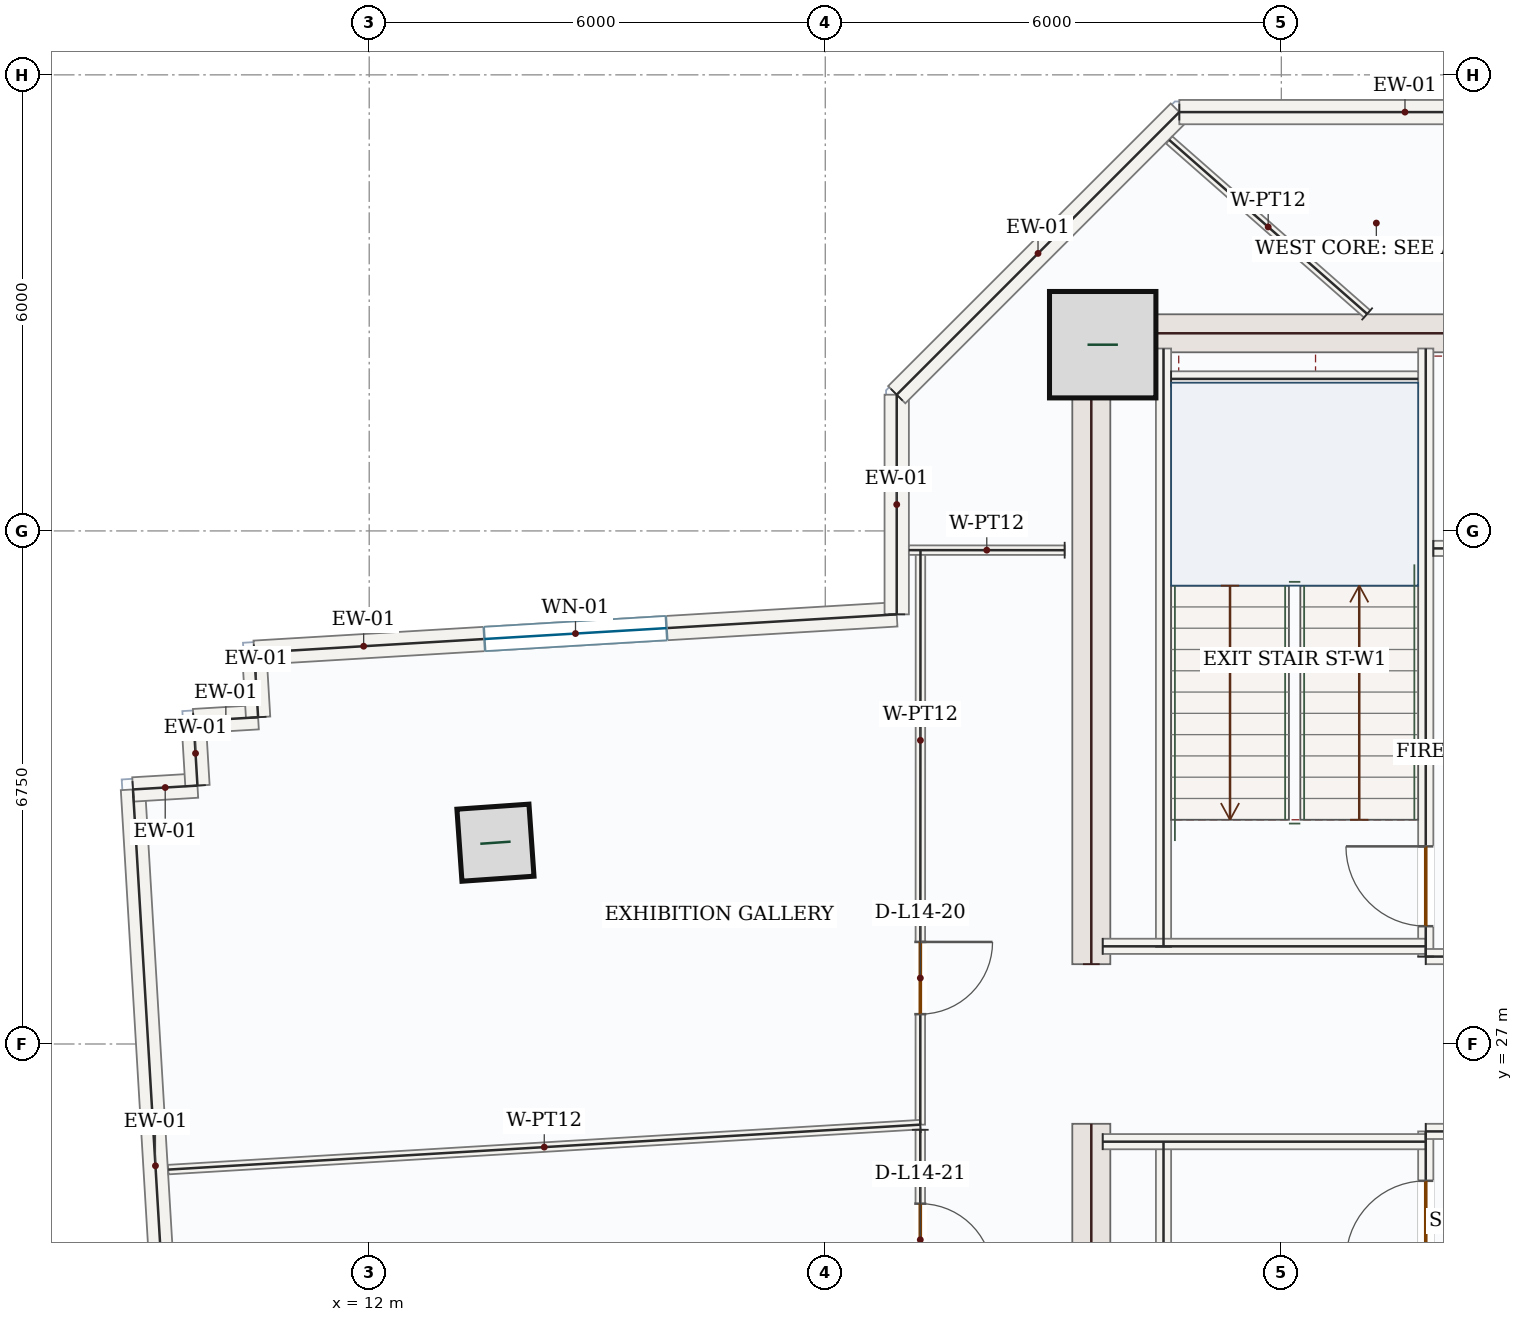
"""IFC4 building model, lengths in metres.
Left out: names, types, materials, properties, quantities, classifications, styles, units other than length and angle.
Written with IfcOpenShell. Run it as: python <this file> out.ifc"""

import sys

from ifc_helpers import new_model, si_unit, direction, frame, frame_2d, origin, origin_2d, place, context, subcontext, project, spatial, rectangle, hollow_rectangle, extrude, source, transform, mapped, element, fill, save


model = new_model("IFC4")
c1 = context("Model", 3, precision=1e-05, world=origin(), true_north=direction((0.0, 1.0)))
c2 = subcontext(c1, "Body", "Model", "MODEL_VIEW")
j1 = project(units=[si_unit("LENGTHUNIT", "METRE"), si_unit("PLANEANGLEUNIT", "RADIAN")], contexts=[c1])
p1 = place(None, origin())
s1 = spatial("IfcSite", under=j1, at=p1, CompositionType="ELEMENT")
p2 = place(p1, origin())
s2 = spatial("IfcBuilding", under=s1, at=p2, CompositionType="ELEMENT")
p3 = place(p2, frame((0.0, 0.0, 66.9)))
s3 = spatial("IfcBuildingStorey", under=s2, at=p3, CompositionType="ELEMENT", Elevation=66.9)
m1 = source(origin(), c2, "Body", "SweptSolid", [
    extrude(rectangle(XDim=8.55, YDim=0.5, at=frame_2d((4.275, 0.0))), origin(), (0.0, 0.0, 1.0), 3.95),
])
for number, where, z_axis, x_axis in (
    (1, (21.5, 17.4, 0.0), (0.0, 0.0, 1.0), (0.0, 1.0, 0.0)),
    (2, (21.5, 28.05, 0.0), (0.0, 0.0, 1.0), (0.0, 1.0, 0.0)),
):
    element("IfcWall", number, at=place(p3, frame(where, z_axis=z_axis, x_axis=x_axis)), inside=s3, PredefinedType="SHEAR", context=c2, shape_type="MappedRepresentation", body=[
        mapped(m1, transform((0.0, 0.0, 0.0), x_axis=(1.0, 0.0, 0.0), y_axis=(0.0, 1.0, 0.0), z_axis=(0.0, 0.0, 1.0), scale=1.0)),
    ])
m2 = source(origin(), c2, "Body", "SweptSolid", [
    extrude(rectangle(XDim=7.0, YDim=0.5, at=frame_2d((3.5, 0.0))), origin(), (0.0, 0.0, 1.0), 3.95),
])
p4 = place(p3, frame((21.75, 36.35, 0.0), z_axis=(0.0, 0.0, 1.0), x_axis=(1.0, 0.0, 0.0)))
e3 = element("IfcWall", 3, at=p4, inside=s3, PredefinedType="SHEAR", context=c2, shape_type="MappedRepresentation", body=[
    mapped(m2, transform((0.0, 0.0, 0.0), x_axis=(1.0, 0.0, 0.0), y_axis=(0.0, 1.0, 0.0), z_axis=(0.0, 0.0, 1.0), scale=1.0)),
])
m3 = source(origin(), c2, "Body", "SweptSolid", [
    extrude(rectangle(XDim=1.4, YDim=1.4, at=origin_2d()), origin(), (0.0, 0.0, 1.0), 4.2),
])
p5 = place(p3, frame((21.65, 36.2, 0.0), z_axis=(0.0, 0.0, 1.0), x_axis=(1.0, 0.0, 0.0)))
e4 = element("IfcColumn", 4, at=p5, inside=s3, PredefinedType="COLUMN", context=c2, shape_type="MappedRepresentation", body=[
    mapped(m3, transform((0.0, 0.0, 0.0), x_axis=(1.0, 0.0, 0.0), y_axis=(0.0, 1.0, 0.0), z_axis=(0.0, 0.0, 1.0), scale=1.0)),
])
m4 = source(origin(), c2, "Body", "SweptSolid", [
    extrude(hollow_rectangle(XDim=0.95, YDim=0.95, WallThickness=0.05, at=origin_2d()), origin(), (0.0, 0.0, 1.0), 4.2),
])
p6 = place(p3, frame((13.661, 29.648, 0.0), z_axis=(0.0, 0.0, 1.0), x_axis=(0.99756405026, 0.069756473744, 0.0)))
e5 = element("IfcColumn", 5, at=p6, inside=s3, PredefinedType="COLUMN", context=c2, shape_type="MappedRepresentation", body=[
    mapped(m4, transform((0.0, 0.0, 0.0), x_axis=(1.0, 0.0, 0.0), y_axis=(0.0, 1.0, 0.0), z_axis=(0.0, 0.0, 1.0), scale=1.0)),
])
m5 = source(origin(), c2, "Body", "SweptSolid", [
    extrude(rectangle(XDim=9.92, YDim=0.32, at=frame_2d((4.96, 0.0))), origin(), (0.0, 0.0, 1.0), 3.95),
])
p7 = place(p3, frame((9.484, 20.447, 0.0), z_axis=(0.0, 0.0, 1.0), x_axis=(-0.059656871726, 0.998218942745, 0.0)))
e6 = element("IfcWall", 6, at=p7, inside=s3, PredefinedType="SOLIDWALL", context=c2, shape_type="MappedRepresentation", body=[
    mapped(m5, transform((0.0, 0.0, 0.0), x_axis=(1.0, 0.0, 0.0), y_axis=(0.0, 1.0, 0.0), z_axis=(0.0, 0.0, 1.0), scale=1.0)),
])
m6 = source(origin(), c2, "Body", "SweptSolid", [
    extrude(rectangle(XDim=0.85, YDim=0.32, at=frame_2d((0.425, 0.0))), origin(), (0.0, 0.0, 1.0), 3.95),
])
for number, where, z_axis, x_axis in (
    (7, (8.892, 30.349, 0.0), (0.0, 0.0, 1.0), (0.998, 0.059, 0.0)),
    (8, (9.74, 30.399, 0.0), (0.0, 0.0, 1.0), (-0.06, 0.998, 0.0)),
):
    element("IfcWall", number, at=place(p3, frame(where, z_axis=z_axis, x_axis=x_axis)), inside=s3, PredefinedType="SOLIDWALL", context=c2, shape_type="MappedRepresentation", body=[
        mapped(m6, transform((0.0, 0.0, 0.0), x_axis=(1.0, 0.0, 0.0), y_axis=(0.0, 1.0, 0.0), z_axis=(0.0, 0.0, 1.0), scale=1.0)),
    ])
m7 = source(origin(), c2, "Body", "SweptSolid", [
    extrude(rectangle(XDim=0.85, YDim=0.32, at=frame_2d((0.425, 0.0))), origin(), (0.0, 0.0, 1.0), 3.95),
])
p8 = place(p3, frame((9.69, 31.248, 0.0), z_axis=(0.0, 0.0, 1.0), x_axis=(0.998230513845, 0.059462939961, 0.0)))
e9 = element("IfcWall", 9, at=p8, inside=s3, PredefinedType="SOLIDWALL", context=c2, shape_type="MappedRepresentation", body=[
    mapped(m7, transform((0.0, 0.0, 0.0), x_axis=(1.0, 0.0, 0.0), y_axis=(0.0, 1.0, 0.0), z_axis=(0.0, 0.0, 1.0), scale=1.0)),
])
p9 = place(p3, frame((10.538, 31.299, 0.0), z_axis=(0.0, 0.0, 1.0), x_axis=(-0.059445893707, 0.998231529116, 0.0)))
e10 = element("IfcWall", 10, at=p9, inside=s3, PredefinedType="SOLIDWALL", context=c2, shape_type="MappedRepresentation", body=[
    mapped(m6, transform((0.0, 0.0, 0.0), x_axis=(1.0, 0.0, 0.0), y_axis=(0.0, 1.0, 0.0), z_axis=(0.0, 0.0, 1.0), scale=1.0)),
])
p10 = place(p3, frame((10.488, 32.147, 0.0), z_axis=(0.0, 0.0, 1.0), x_axis=(0.998219055518, 0.059654984716, 0.0)))
e11 = element("IfcWall", 11, at=p10, inside=s3, PredefinedType="SOLIDWALL", context=c2, shape_type="SweptSolid", body=[
    extrude(rectangle(XDim=8.468, YDim=0.32, at=frame_2d((4.234, 0.0))), origin(), (0.0, 0.0, 1.0), 3.95),
])
p11 = place(p10, frame((3.034, 0.0, 0.85)))
e12 = element("IfcOpeningElement", 12, at=p11, cuts=e11, PredefinedType="OPENING", context=c2, shape_type="SweptSolid", body=[
    extrude(rectangle(XDim=2.4, YDim=1.8, at=frame_2d((1.2, 0.9))), frame((0.0, 0.17, 0.0), z_axis=(0.0, -1.0, 0.0), x_axis=(1.0, 0.0, 0.0)), (0.0, 0.0, 1.0), 0.34),
])
m8 = source(origin(), c2, "Body", "SweptSolid", [
    extrude(rectangle(XDim=2.89, YDim=0.32, at=frame_2d((1.445, 0.0))), origin(), (0.0, 0.0, 1.0), 3.95),
])
p12 = place(p3, frame((18.94, 32.652, 0.0), z_axis=(0.0, 0.0, 1.0), x_axis=(0.0, 1.0, 0.0)))
e13 = element("IfcWall", 13, at=p12, inside=s3, PredefinedType="SOLIDWALL", context=c2, shape_type="MappedRepresentation", body=[
    mapped(m8, transform((0.0, 0.0, 0.0), x_axis=(1.0, 0.0, 0.0), y_axis=(0.0, 1.0, 0.0), z_axis=(0.0, 0.0, 1.0), scale=1.0)),
])
m9 = source(origin(), c2, "Body", "SweptSolid", [
    extrude(rectangle(XDim=5.258, YDim=0.32, at=frame_2d((2.629, 0.0))), origin(), (0.0, 0.0, 1.0), 3.95),
])
p13 = place(p3, frame((18.94, 35.542, 0.0), z_axis=(0.0, 0.0, 1.0), x_axis=(0.707106781187, 0.707106781187, 0.0)))
e14 = element("IfcWall", 14, at=p13, inside=s3, PredefinedType="SOLIDWALL", context=c2, shape_type="MappedRepresentation", body=[
    mapped(m9, transform((0.0, 0.0, 0.0), x_axis=(1.0, 0.0, 0.0), y_axis=(0.0, 1.0, 0.0), z_axis=(0.0, 0.0, 1.0), scale=1.0)),
])
m10 = source(origin(), c2, "Body", "SweptSolid", [
    extrude(rectangle(XDim=5.938, YDim=0.32, at=frame_2d((2.969, 0.0))), origin(), (0.0, 0.0, 1.0), 3.95),
])
p14 = place(p3, frame((22.658, 39.26, 0.0), z_axis=(0.0, 0.0, 1.0), x_axis=(1.0, 0.0, 0.0)))
e15 = element("IfcWall", 15, at=p14, inside=s3, PredefinedType="SOLIDWALL", context=c2, shape_type="MappedRepresentation", body=[
    mapped(m10, transform((0.0, 0.0, 0.0), x_axis=(1.0, 0.0, 0.0), y_axis=(0.0, 1.0, 0.0), z_axis=(0.0, 0.0, 1.0), scale=1.0)),
])
m11 = source(origin(), c2, "Body", "SweptSolid", [
    extrude(rectangle(XDim=7.87, YDim=0.2, at=frame_2d((3.935, 0.0))), origin(), (0.0, 0.0, 1.0), 3.95),
])
for number, where, z_axis, x_axis in (
    (16, (22.45, 17.85, 0.0), (0.0, 0.0, 1.0), (0.0, 1.0, 0.0)),
    (17, (22.45, 28.28, 0.0), (0.0, 0.0, 1.0), (0.0, 1.0, 0.0)),
):
    element("IfcWall", number, at=place(p3, frame(where, z_axis=z_axis, x_axis=x_axis)), inside=s3, PredefinedType="SOLIDWALL", context=c2, shape_type="MappedRepresentation", body=[
        mapped(m11, transform((0.0, 0.0, 0.0), x_axis=(1.0, 0.0, 0.0), y_axis=(0.0, 1.0, 0.0), z_axis=(0.0, 0.0, 1.0), scale=1.0)),
    ])
p15 = place(p3, frame((25.9, 17.85, 0.0), z_axis=(0.0, 0.0, 1.0), x_axis=(0.0, 1.0, 0.0)))
e18 = element("IfcWall", 18, at=p15, inside=s3, PredefinedType="SOLIDWALL", context=c2, shape_type="SweptSolid", body=[
    extrude(rectangle(XDim=8.0, YDim=0.2, at=frame_2d((4.0, 0.0))), origin(), (0.0, 0.0, 1.0), 3.95),
])
p16 = place(p15, frame((6.3, 0.0, 0.0)))
e19 = element("IfcOpeningElement", 19, at=p16, cuts=e18, PredefinedType="OPENING", context=c2, shape_type="SweptSolid", body=[
    extrude(rectangle(XDim=1.05, YDim=2.15, at=frame_2d((0.525, 1.075))), frame((0.0, 0.11, 0.0), z_axis=(0.0, -1.0, 0.0), x_axis=(1.0, 0.0, 0.0)), (0.0, 0.0, 1.0), 0.22),
])
p17 = place(p3, frame((25.9, 28.15, 0.0), z_axis=(0.0, 0.0, 1.0), x_axis=(0.0, 1.0, 0.0)))
e20 = element("IfcWall", 20, at=p17, inside=s3, PredefinedType="SOLIDWALL", context=c2, shape_type="SweptSolid", body=[
    extrude(rectangle(XDim=8.0, YDim=0.2, at=frame_2d((4.0, 0.0))), origin(), (0.0, 0.0, 1.0), 3.95),
])
p18 = place(p17, frame((0.4, 0.0, 0.0)))
e21 = element("IfcOpeningElement", 21, at=p18, cuts=e20, PredefinedType="OPENING", context=c2, shape_type="SweptSolid", body=[
    extrude(rectangle(XDim=1.05, YDim=2.15, at=frame_2d((0.525, 1.075))), frame((0.0, 0.11, 0.0), z_axis=(0.0, -1.0, 0.0), x_axis=(1.0, 0.0, 0.0)), (0.0, 0.0, 1.0), 0.22),
])
m12 = source(origin(), c2, "Body", "SweptSolid", [
    extrude(rectangle(XDim=4.25, YDim=0.2, at=frame_2d((2.125, 0.0))), origin(), (0.0, 0.0, 1.0), 3.95),
])
p19 = place(p3, frame((21.65, 25.715, 0.0), z_axis=(0.0, 0.0, 1.0), x_axis=(1.0, 0.0, 0.0)))
e22 = element("IfcWall", 22, at=p19, inside=s3, PredefinedType="SOLIDWALL", context=c2, shape_type="MappedRepresentation", body=[
    mapped(m12, transform((0.0, 0.0, 0.0), x_axis=(1.0, 0.0, 0.0), y_axis=(0.0, 1.0, 0.0), z_axis=(0.0, 0.0, 1.0), scale=1.0)),
])
m13 = source(origin(), c2, "Body", "SweptSolid", [
    extrude(rectangle(XDim=3.0, YDim=0.2, at=frame_2d((1.5, 0.0))), origin(), (0.0, 0.0, 1.0), 3.95),
])
p20 = place(p3, frame((25.9, 25.85, 0.0), z_axis=(0.0, 0.0, 1.0), x_axis=(1.0, 0.0, 0.0)))
e23 = element("IfcWall", 23, at=p20, inside=s3, PredefinedType="SOLIDWALL", context=c2, shape_type="MappedRepresentation", body=[
    mapped(m13, transform((0.0, 0.0, 0.0), x_axis=(1.0, 0.0, 0.0), y_axis=(0.0, 1.0, 0.0), z_axis=(0.0, 0.0, 1.0), scale=1.0)),
])
p21 = place(p3, frame((21.65, 28.285, 0.0), z_axis=(0.0, 0.0, 1.0), x_axis=(1.0, 0.0, 0.0)))
e24 = element("IfcWall", 24, at=p21, inside=s3, PredefinedType="SOLIDWALL", context=c2, shape_type="MappedRepresentation", body=[
    mapped(m12, transform((0.0, 0.0, 0.0), x_axis=(1.0, 0.0, 0.0), y_axis=(0.0, 1.0, 0.0), z_axis=(0.0, 0.0, 1.0), scale=1.0)),
])
p22 = place(p3, frame((25.9, 28.15, 0.0), z_axis=(0.0, 0.0, 1.0), x_axis=(1.0, 0.0, 0.0)))
e25 = element("IfcWall", 25, at=p22, inside=s3, PredefinedType="SOLIDWALL", context=c2, shape_type="MappedRepresentation", body=[
    mapped(m13, transform((0.0, 0.0, 0.0), x_axis=(1.0, 0.0, 0.0), y_axis=(0.0, 1.0, 0.0), z_axis=(0.0, 0.0, 1.0), scale=1.0)),
])
m14 = source(origin(), c2, "Body", "SweptSolid", [
    extrude(rectangle(XDim=3.25, YDim=0.2, at=frame_2d((1.625, 0.0))), origin(), (0.0, 0.0, 1.0), 3.95),
])
p23 = place(p3, frame((22.55, 35.75, 0.0), z_axis=(0.0, 0.0, 1.0), x_axis=(1.0, 0.0, 0.0)))
e26 = element("IfcWall", 26, at=p23, inside=s3, PredefinedType="SOLIDWALL", context=c2, shape_type="MappedRepresentation", body=[
    mapped(m14, transform((0.0, 0.0, 0.0), x_axis=(1.0, 0.0, 0.0), y_axis=(0.0, 1.0, 0.0), z_axis=(0.0, 0.0, 1.0), scale=1.0)),
])
p24 = place(p3, frame((26.0, 33.52, 0.0), z_axis=(0.0, 0.0, 1.0), x_axis=(1.0, 0.0, 0.0)))
e27 = element("IfcWall", 27, at=p24, inside=s3, PredefinedType="SOLIDWALL", context=c2, shape_type="SweptSolid", body=[
    extrude(rectangle(XDim=2.75, YDim=0.2, at=frame_2d((1.375, 0.0))), origin(), (0.0, 0.0, 1.0), 3.95),
])
p25 = place(p24, frame((0.82, 0.0, 0.0)))
e28 = element("IfcOpeningElement", 28, at=p25, cuts=e27, PredefinedType="OPENING", context=c2, shape_type="SweptSolid", body=[
    extrude(rectangle(XDim=1.1, YDim=2.15, at=frame_2d((0.55, 1.075))), frame((0.0, 0.11, 0.0), z_axis=(0.0, -1.0, 0.0), x_axis=(1.0, 0.0, 0.0)), (0.0, 0.0, 1.0), 0.22),
])
m15 = source(origin(), c2, "Body", "SweptSolid", [
    extrude(rectangle(XDim=3.467, YDim=0.125, at=frame_2d((1.733, 0.0))), origin(), (0.0, 0.0, 1.0), 3.95),
])
p26 = place(p3, frame((25.129, 36.605, 0.0), z_axis=(0.0, 0.0, 1.0), x_axis=(-0.751135268809, 0.66014832269, 0.0)))
e29 = element("IfcWall", 29, at=p26, inside=s3, PredefinedType="PARTITIONING", context=c2, shape_type="MappedRepresentation", body=[
    mapped(m15, transform((0.0, 0.0, 0.0), x_axis=(1.0, 0.0, 0.0), y_axis=(0.0, 1.0, 0.0), z_axis=(0.0, 0.0, 1.0), scale=1.0)),
])
p27 = place(p3, frame((19.253, 33.497, 0.0), z_axis=(0.0, 0.0, 1.0), x_axis=(-0.000355308612, -0.999999936878, 0.0)))
e30 = element("IfcWall", 30, at=p27, inside=s3, PredefinedType="PARTITIONING", context=c2, shape_type="SweptSolid", body=[
    extrude(rectangle(XDim=7.558, YDim=0.125, at=frame_2d((3.779, 0.0))), origin(), (0.0, 0.0, 1.0), 3.95),
])
p28 = place(p27, frame((5.155, 0.0, 0.0)))
e31 = element("IfcOpeningElement", 31, at=p28, cuts=e30, PredefinedType="OPENING", context=c2, shape_type="SweptSolid", body=[
    extrude(rectangle(XDim=0.95, YDim=2.15, at=frame_2d((0.475, 1.075))), frame((0.0, 0.073, 0.0), z_axis=(0.0, -1.0, 0.0), x_axis=(1.0, 0.0, 0.0)), (0.0, 0.0, 1.0), 0.145),
])
m16 = source(origin(), c2, "Body", "SweptSolid", [
    extrude(rectangle(XDim=9.911, YDim=0.125, at=frame_2d((4.956, 0.0))), origin(), (0.0, 0.0, 1.0), 3.95),
])
p29 = place(p3, frame((19.25, 25.939, 0.0), z_axis=(0.0, 0.0, 1.0), x_axis=(-0.998218808208, -0.05965912285, 0.0)))
e32 = element("IfcWall", 32, at=p29, inside=s3, PredefinedType="PARTITIONING", context=c2, shape_type="MappedRepresentation", body=[
    mapped(m16, transform((0.0, 0.0, 0.0), x_axis=(1.0, 0.0, 0.0), y_axis=(0.0, 1.0, 0.0), z_axis=(0.0, 0.0, 1.0), scale=1.0)),
])
m17 = source(origin(), c2, "Body", "SweptSolid", [
    extrude(rectangle(XDim=2.049, YDim=0.125, at=frame_2d((1.025, 0.0))), origin(), (0.0, 0.0, 1.0), 3.95),
])
p30 = place(p3, frame((21.149, 33.497, 0.0), z_axis=(0.0, 0.0, 1.0), x_axis=(-0.999999936133, 0.000357398119, 0.0)))
e33 = element("IfcWall", 33, at=p30, inside=s3, PredefinedType="PARTITIONING", context=c2, shape_type="MappedRepresentation", body=[
    mapped(m17, transform((0.0, 0.0, 0.0), x_axis=(1.0, 0.0, 0.0), y_axis=(0.0, 1.0, 0.0), z_axis=(0.0, 0.0, 1.0), scale=1.0)),
])
p31 = place(p3, frame((19.25, 25.871, 0.0), z_axis=(0.0, 0.0, 1.0), x_axis=(9.0962841e-05, -0.999999995863, 0.0)))
e34 = element("IfcWall", 34, at=p31, inside=s3, PredefinedType="PARTITIONING", context=c2, shape_type="SweptSolid", body=[
    extrude(rectangle(XDim=5.368, YDim=0.125, at=frame_2d((2.684, 0.0))), origin(), (0.0, 0.0, 1.0), 3.95),
])
p32 = place(p31, frame((0.972, 0.0, 0.0)))
e35 = element("IfcOpeningElement", 35, at=p32, cuts=e34, PredefinedType="OPENING", context=c2, shape_type="SweptSolid", body=[
    extrude(rectangle(XDim=0.95, YDim=2.15, at=frame_2d((0.475, 1.075))), frame((0.0, 0.073, 0.0), z_axis=(0.0, -1.0, 0.0), x_axis=(1.0, 0.0, 0.0)), (0.0, 0.0, 1.0), 0.145),
])
m18 = source(origin(), c2, "Body", "SweptSolid", [
    extrude(rectangle(XDim=2.4, YDim=1.8, at=frame_2d((1.2, 0.9))), frame((0.0, 0.03, 0.0), z_axis=(0.0, -1.0, 0.0), x_axis=(1.0, 0.0, 0.0)), (0.0, 0.0, 1.0), 0.06),
])
p33 = place(p11, origin())
e36 = element("IfcWindow", 36, at=p33, inside=s3, PartitioningType="DOUBLE_PANEL_VERTICAL", PredefinedType="WINDOW", context=c2, shape_type="MappedRepresentation", body=[
    mapped(m18, transform((0.0, 0.0, 0.0), x_axis=(1.0, 0.0, 0.0), y_axis=(0.0, 1.0, 0.0), z_axis=(0.0, 0.0, 1.0), scale=1.0)),
])
fill(e12, e36)
m19 = source(origin(), c2, "Body", "SweptSolid", [
    extrude(rectangle(XDim=1.05, YDim=2.15, at=frame_2d((0.525, 1.075))), frame((0.0, 0.025, 0.0), z_axis=(0.0, -1.0, 0.0), x_axis=(1.0, 0.0, 0.0)), (0.0, 0.0, 1.0), 0.05),
])
p34 = place(p18, origin())
e37 = element("IfcDoor", 37, at=p34, inside=s3, OperationType="SINGLE_SWING_RIGHT", PredefinedType="DOOR", context=c2, shape_type="MappedRepresentation", body=[
    mapped(m19, transform((0.0, 0.0, 0.0), x_axis=(1.0, 0.0, 0.0), y_axis=(0.0, 1.0, 0.0), z_axis=(0.0, 0.0, 1.0), scale=1.0)),
])
fill(e21, e37)
p35 = place(p16, origin())
e38 = element("IfcDoor", 38, at=p35, inside=s3, OperationType="SINGLE_SWING_LEFT", PredefinedType="DOOR", context=c2, shape_type="MappedRepresentation", body=[
    mapped(m19, transform((0.0, 0.0, 0.0), x_axis=(1.0, 0.0, 0.0), y_axis=(0.0, 1.0, 0.0), z_axis=(0.0, 0.0, 1.0), scale=1.0)),
])
fill(e19, e38)
m20 = source(origin(), c2, "Body", "SweptSolid", [
    extrude(rectangle(XDim=0.95, YDim=2.15, at=frame_2d((0.475, 1.075))), frame((0.0, 0.025, 0.0), z_axis=(0.0, -1.0, 0.0), x_axis=(1.0, 0.0, 0.0)), (0.0, 0.0, 1.0), 0.05),
])
p36 = place(p28, origin())
e39 = element("IfcDoor", 39, at=p36, inside=s3, OperationType="SINGLE_SWING_LEFT", PredefinedType="DOOR", context=c2, shape_type="MappedRepresentation", body=[
    mapped(m20, transform((0.0, 0.0, 0.0), x_axis=(1.0, 0.0, 0.0), y_axis=(0.0, 1.0, 0.0), z_axis=(0.0, 0.0, 1.0), scale=1.0)),
])
fill(e31, e39)
p37 = place(p32, origin())
e40 = element("IfcDoor", 40, at=p37, inside=s3, OperationType="SINGLE_SWING_RIGHT", PredefinedType="DOOR", context=c2, shape_type="MappedRepresentation", body=[
    mapped(m20, transform((0.0, 0.0, 0.0), x_axis=(1.0, 0.0, 0.0), y_axis=(0.0, 1.0, 0.0), z_axis=(0.0, 0.0, 1.0), scale=1.0)),
])
fill(e35, e40)
save(model, sys.argv[1])
